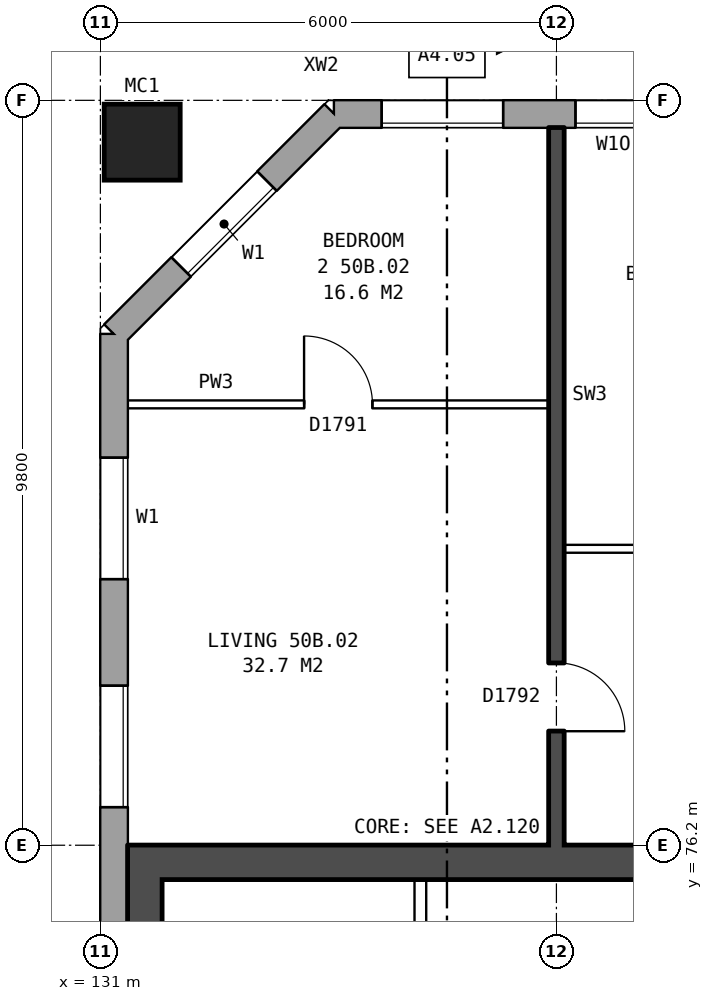
"""IFC4 building model, lengths in metres.
Left out: names, types, materials, properties, quantities, classifications, styles, units other than length and angle.
Written with IfcOpenShell. Run it as: python <this file> out.ifc"""

import sys

from ifc_helpers import new_model, si_unit, direction, frame, frame_2d, origin, origin_2d, place, context, subcontext, project, spatial, rectangle, hollow_rectangle, extrude, element, fill, save


model = new_model("IFC4")
c1 = context("Model", 3, precision=1e-05, world=origin(), true_north=direction((0.0, 1.0)))
c2 = subcontext(c1, "Body", "Model", "MODEL_VIEW")
j1 = project(units=[si_unit("LENGTHUNIT", "METRE"), si_unit("PLANEANGLEUNIT", "RADIAN")], contexts=[c1])
p1 = place(None, origin())
s1 = spatial("IfcSite", under=j1, at=p1, CompositionType="ELEMENT")
p2 = place(p1, origin())
s2 = spatial("IfcBuilding", under=s1, at=p2, CompositionType="ELEMENT")
p3 = place(p2, frame((0.0, 0.0, 178.9)))
s3 = spatial("IfcBuildingStorey", under=s2, at=p3, CompositionType="ELEMENT", Elevation=178.9)
p4 = place(p3, frame((131.55, 85.45, 0.0), z_axis=(0.0, 0.0, 1.0), x_axis=(1.0, 0.0, 0.0)))
e1 = element("IfcColumn", 1, at=p4, inside=s3, PredefinedType="COLUMN", context=c2, shape_type="SweptSolid", body=[
    extrude(hollow_rectangle(XDim=1.0, YDim=1.0, WallThickness=0.055, at=origin_2d()), origin(), (0.0, 0.0, 1.0), 3.1),
])
p5 = place(p3, frame((167.175, 85.82, 0.0), z_axis=(0.0, 0.0, 1.0), x_axis=(-1.0, 0.0, 0.0)))
e2 = element("IfcWall", 2, at=p5, inside=s3, PredefinedType="STANDARD", context=c2, shape_type="SweptSolid", body=[
    extrude(rectangle(XDim=33.101, YDim=0.36, at=frame_2d((16.55, 0.0))), origin(), (0.0, 0.0, 1.0), 2.85),
])
p6 = place(p5, frame((0.875, 0.0, 0.8)))
e3 = element("IfcOpeningElement", 3, at=p6, cuts=e2, PredefinedType="OPENING", context=c2, shape_type="SweptSolid", body=[
    extrude(rectangle(XDim=1.6, YDim=1.8, at=frame_2d((0.8, 0.9))), frame((0.0, 0.19, 0.0), z_axis=(0.0, -1.0, 0.0), x_axis=(1.0, 0.0, 0.0)), (0.0, 0.0, 1.0), 0.38),
])
p7 = place(p5, frame((2.8, 0.0, 1.4)))
e4 = element("IfcOpeningElement", 4, at=p7, cuts=e2, PredefinedType="OPENING", context=c2, shape_type="SweptSolid", body=[
    extrude(rectangle(XDim=1.4, YDim=1.2, at=frame_2d((0.7, 0.6))), frame((0.0, 0.19, 0.0), z_axis=(0.0, -1.0, 0.0), x_axis=(1.0, 0.0, 0.0)), (0.0, 0.0, 1.0), 0.38),
])
p8 = place(p5, frame((6.875, 0.0, 0.8)))
e5 = element("IfcOpeningElement", 5, at=p8, cuts=e2, PredefinedType="OPENING", context=c2, shape_type="SweptSolid", body=[
    extrude(rectangle(XDim=1.6, YDim=1.8, at=frame_2d((0.8, 0.9))), frame((0.0, 0.19, 0.0), z_axis=(0.0, -1.0, 0.0), x_axis=(1.0, 0.0, 0.0)), (0.0, 0.0, 1.0), 0.38),
])
p9 = place(p5, frame((9.875, 0.0, 0.8)))
e6 = element("IfcOpeningElement", 6, at=p9, cuts=e2, PredefinedType="OPENING", context=c2, shape_type="SweptSolid", body=[
    extrude(rectangle(XDim=1.6, YDim=1.8, at=frame_2d((0.8, 0.9))), frame((0.0, 0.19, 0.0), z_axis=(0.0, -1.0, 0.0), x_axis=(1.0, 0.0, 0.0)), (0.0, 0.0, 1.0), 0.38),
])
p10 = place(p5, frame((12.875, 0.0, 0.8)))
e7 = element("IfcOpeningElement", 7, at=p10, cuts=e2, PredefinedType="OPENING", context=c2, shape_type="SweptSolid", body=[
    extrude(rectangle(XDim=1.6, YDim=1.8, at=frame_2d((0.8, 0.9))), frame((0.0, 0.19, 0.0), z_axis=(0.0, -1.0, 0.0), x_axis=(1.0, 0.0, 0.0)), (0.0, 0.0, 1.0), 0.38),
])
p11 = place(p5, frame((15.875, 0.0, 0.8)))
e8 = element("IfcOpeningElement", 8, at=p11, cuts=e2, PredefinedType="OPENING", context=c2, shape_type="SweptSolid", body=[
    extrude(rectangle(XDim=1.6, YDim=1.8, at=frame_2d((0.8, 0.9))), frame((0.0, 0.19, 0.0), z_axis=(0.0, -1.0, 0.0), x_axis=(1.0, 0.0, 0.0)), (0.0, 0.0, 1.0), 0.38),
])
p12 = place(p5, frame((18.875, 0.0, 0.8)))
e9 = element("IfcOpeningElement", 9, at=p12, cuts=e2, PredefinedType="OPENING", context=c2, shape_type="SweptSolid", body=[
    extrude(rectangle(XDim=1.6, YDim=1.8, at=frame_2d((0.8, 0.9))), frame((0.0, 0.19, 0.0), z_axis=(0.0, -1.0, 0.0), x_axis=(1.0, 0.0, 0.0)), (0.0, 0.0, 1.0), 0.38),
])
p13 = place(p5, frame((21.875, 0.0, 0.8)))
e10 = element("IfcOpeningElement", 10, at=p13, cuts=e2, PredefinedType="OPENING", context=c2, shape_type="SweptSolid", body=[
    extrude(rectangle(XDim=1.6, YDim=1.8, at=frame_2d((0.8, 0.9))), frame((0.0, 0.19, 0.0), z_axis=(0.0, -1.0, 0.0), x_axis=(1.0, 0.0, 0.0)), (0.0, 0.0, 1.0), 0.38),
])
p14 = place(p5, frame((24.875, 0.0, 0.8)))
e11 = element("IfcOpeningElement", 11, at=p14, cuts=e2, PredefinedType="OPENING", context=c2, shape_type="SweptSolid", body=[
    extrude(rectangle(XDim=1.6, YDim=1.8, at=frame_2d((0.8, 0.9))), frame((0.0, 0.19, 0.0), z_axis=(0.0, -1.0, 0.0), x_axis=(1.0, 0.0, 0.0)), (0.0, 0.0, 1.0), 0.38),
])
p15 = place(p5, frame((26.775, 0.0, 0.8)))
e12 = element("IfcOpeningElement", 12, at=p15, cuts=e2, PredefinedType="OPENING", context=c2, shape_type="SweptSolid", body=[
    extrude(rectangle(XDim=0.8, YDim=0.9, at=frame_2d((0.4, 0.45))), frame((0.0, 0.19, 0.0), z_axis=(0.0, -1.0, 0.0), x_axis=(1.0, 0.0, 0.0)), (0.0, 0.0, 1.0), 0.38),
])
p16 = place(p5, frame((30.875, 0.0, 0.8)))
e13 = element("IfcOpeningElement", 13, at=p16, cuts=e2, PredefinedType="OPENING", context=c2, shape_type="SweptSolid", body=[
    extrude(rectangle(XDim=1.6, YDim=1.8, at=frame_2d((0.8, 0.9))), frame((0.0, 0.19, 0.0), z_axis=(0.0, -1.0, 0.0), x_axis=(1.0, 0.0, 0.0)), (0.0, 0.0, 1.0), 0.38),
])
p17 = place(p5, frame((28.925, 0.0, 1.4)))
e14 = element("IfcOpeningElement", 14, at=p17, cuts=e2, PredefinedType="OPENING", context=c2, shape_type="SweptSolid", body=[
    extrude(rectangle(XDim=1.0, YDim=1.2, at=frame_2d((0.5, 0.6))), frame((0.0, 0.19, 0.0), z_axis=(0.0, -1.0, 0.0), x_axis=(1.0, 0.0, 0.0)), (0.0, 0.0, 1.0), 0.38),
])
p18 = place(p3, frame((134.075, 85.82, 0.0), z_axis=(0.0, 0.0, 1.0), x_axis=(-0.707106781187, -0.707106781187, 0.0)))
e15 = element("IfcWall", 15, at=p18, inside=s3, PredefinedType="STANDARD", context=c2, shape_type="SweptSolid", body=[
    extrude(rectangle(XDim=4.094, YDim=0.36, at=frame_2d((2.047, 0.0))), origin(), (0.0, 0.0, 1.0), 2.85),
])
p19 = place(p18, frame((1.247, 0.0, 0.8)))
e16 = element("IfcOpeningElement", 16, at=p19, cuts=e15, PredefinedType="OPENING", context=c2, shape_type="SweptSolid", body=[
    extrude(rectangle(XDim=1.6, YDim=1.8, at=frame_2d((0.8, 0.9))), frame((0.0, 0.19, 0.0), z_axis=(0.0, -1.0, 0.0), x_axis=(1.0, 0.0, 0.0)), (0.0, 0.0, 1.0), 0.38),
])
p20 = place(p3, frame((131.18, 82.925, 0.0), z_axis=(0.0, 0.0, 1.0), x_axis=(0.0, -1.0, 0.0)))
e17 = element("IfcWall", 17, at=p20, inside=s3, PredefinedType="STANDARD", context=c2, shape_type="SweptSolid", body=[
    extrude(rectangle(XDim=25.851, YDim=0.36, at=frame_2d((12.925, 0.0))), origin(), (0.0, 0.0, 1.0), 2.85),
])
p21 = place(p20, frame((1.625, 0.0, 0.8)))
e18 = element("IfcOpeningElement", 18, at=p21, cuts=e17, PredefinedType="OPENING", context=c2, shape_type="SweptSolid", body=[
    extrude(rectangle(XDim=1.6, YDim=1.8, at=frame_2d((0.8, 0.9))), frame((0.0, 0.19, 0.0), z_axis=(0.0, -1.0, 0.0), x_axis=(1.0, 0.0, 0.0)), (0.0, 0.0, 1.0), 0.38),
])
p22 = place(p20, frame((4.625, 0.0, 0.8)))
e19 = element("IfcOpeningElement", 19, at=p22, cuts=e17, PredefinedType="OPENING", context=c2, shape_type="SweptSolid", body=[
    extrude(rectangle(XDim=1.6, YDim=1.8, at=frame_2d((0.8, 0.9))), frame((0.0, 0.19, 0.0), z_axis=(0.0, -1.0, 0.0), x_axis=(1.0, 0.0, 0.0)), (0.0, 0.0, 1.0), 0.38),
])
p23 = place(p20, frame((19.625, 0.0, 0.8)))
e20 = element("IfcOpeningElement", 20, at=p23, cuts=e17, PredefinedType="OPENING", context=c2, shape_type="SweptSolid", body=[
    extrude(rectangle(XDim=1.6, YDim=1.8, at=frame_2d((0.8, 0.9))), frame((0.0, 0.19, 0.0), z_axis=(0.0, -1.0, 0.0), x_axis=(1.0, 0.0, 0.0)), (0.0, 0.0, 1.0), 0.38),
])
p24 = place(p20, frame((22.625, 0.0, 0.8)))
e21 = element("IfcOpeningElement", 21, at=p24, cuts=e17, PredefinedType="OPENING", context=c2, shape_type="SweptSolid", body=[
    extrude(rectangle(XDim=1.6, YDim=1.8, at=frame_2d((0.8, 0.9))), frame((0.0, 0.19, 0.0), z_axis=(0.0, -1.0, 0.0), x_axis=(1.0, 0.0, 0.0)), (0.0, 0.0, 1.0), 0.38),
])
p25 = place(p3, frame((131.585, 63.8, 0.0), z_axis=(0.0, 0.0, 1.0), x_axis=(0.0, 1.0, 0.0)))
e22 = element("IfcWall", 22, at=p25, inside=s3, PredefinedType="SHEAR", context=c2, shape_type="SweptSolid", body=[
    extrude(rectangle(XDim=12.4, YDim=0.45, at=frame_2d((6.2, 0.0))), origin(), (0.0, 0.0, 1.0), 2.85),
])
p26 = place(p3, frame((139.31, 75.975, 0.0), z_axis=(0.0, 0.0, 1.0), x_axis=(-1.0, 0.0, 0.0)))
e23 = element("IfcWall", 23, at=p26, inside=s3, PredefinedType="SHEAR", context=c2, shape_type="SweptSolid", body=[
    extrude(rectangle(XDim=7.5, YDim=0.45, at=frame_2d((3.75, 0.0))), origin(), (0.0, 0.0, 1.0), 2.85),
])
p27 = place(p3, frame((135.21, 71.375, 0.0), z_axis=(0.0, 0.0, 1.0), x_axis=(0.0, 1.0, 0.0)))
e24 = element("IfcWall", 24, at=p27, inside=s3, PredefinedType="PARTITIONING", context=c2, shape_type="SweptSolid", body=[
    extrude(rectangle(XDim=4.375, YDim=0.15, at=frame_2d((2.188, 0.0))), origin(), (0.0, 0.0, 1.0), 2.85),
])
p28 = place(p27, frame((2.675, 0.0, 0.0)))
e25 = element("IfcOpeningElement", 25, at=p28, cuts=e24, PredefinedType="OPENING", context=c2, shape_type="SweptSolid", body=[
    extrude(rectangle(XDim=1.1, YDim=2.1, at=frame_2d((0.55, 1.05))), frame((0.0, 0.085, 0.0), z_axis=(0.0, -1.0, 0.0), x_axis=(1.0, 0.0, 0.0)), (0.0, 0.0, 1.0), 0.17),
])
p29 = place(p3, frame((137.1, 80.1, 0.0), z_axis=(0.0, 0.0, 1.0), x_axis=(1.0, 0.0, 0.0)))
e26 = element("IfcWall", 26, at=p29, inside=s3, PredefinedType="PARTITIONING", context=c2, shape_type="SweptSolid", body=[
    extrude(rectangle(XDim=5.8, YDim=0.1, at=frame_2d((2.9, 0.0))), origin(), (0.0, 0.0, 1.0), 2.85),
])
p30 = place(p29, frame((1.3, 0.0, 0.0)))
e27 = element("IfcOpeningElement", 27, at=p30, cuts=e26, PredefinedType="OPENING", context=c2, shape_type="SweptSolid", body=[
    extrude(rectangle(XDim=0.9, YDim=2.1, at=frame_2d((0.45, 1.05))), frame((0.0, 0.06, 0.0), z_axis=(0.0, -1.0, 0.0), x_axis=(1.0, 0.0, 0.0)), (0.0, 0.0, 1.0), 0.12),
])
p31 = place(p29, frame((4.2, 0.0, 0.0)))
e28 = element("IfcOpeningElement", 28, at=p31, cuts=e26, PredefinedType="OPENING", context=c2, shape_type="SweptSolid", body=[
    extrude(rectangle(XDim=0.9, YDim=2.1, at=frame_2d((0.45, 1.05))), frame((0.0, 0.06, 0.0), z_axis=(0.0, -1.0, 0.0), x_axis=(1.0, 0.0, 0.0)), (0.0, 0.0, 1.0), 0.12),
])
p32 = place(p3, frame((131.36, 82.0, 0.0), z_axis=(0.0, 0.0, 1.0), x_axis=(1.0, 0.0, 0.0)))
e29 = element("IfcWall", 29, at=p32, inside=s3, PredefinedType="PARTITIONING", context=c2, shape_type="SweptSolid", body=[
    extrude(rectangle(XDim=5.54, YDim=0.1, at=frame_2d((2.77, 0.0))), origin(), (0.0, 0.0, 1.0), 2.85),
])
p33 = place(p32, frame((2.32, 0.0, 0.0)))
e30 = element("IfcOpeningElement", 30, at=p33, cuts=e29, PredefinedType="OPENING", context=c2, shape_type="SweptSolid", body=[
    extrude(rectangle(XDim=0.9, YDim=2.1, at=frame_2d((0.45, 1.05))), frame((0.0, 0.06, 0.0), z_axis=(0.0, -1.0, 0.0), x_axis=(1.0, 0.0, 0.0)), (0.0, 0.0, 1.0), 0.12),
])
p34 = place(p3, frame((137.0, 76.2, 0.0), z_axis=(0.0, 0.0, 1.0), x_axis=(0.0, 1.0, 0.0)))
e31 = element("IfcWall", 31, at=p34, inside=s3, PredefinedType="SOLIDWALL", context=c2, shape_type="SweptSolid", body=[
    extrude(rectangle(XDim=9.44, YDim=0.2, at=frame_2d((4.72, 0.0))), origin(), (0.0, 0.0, 1.0), 2.85),
])
p35 = place(p34, frame((1.5, 0.0, 0.0)))
e32 = element("IfcOpeningElement", 32, at=p35, cuts=e31, PredefinedType="OPENING", context=c2, shape_type="SweptSolid", body=[
    extrude(rectangle(XDim=0.9, YDim=2.1, at=frame_2d((0.45, 1.05))), frame((0.0, 0.11, 0.0), z_axis=(0.0, -1.0, 0.0), x_axis=(1.0, 0.0, 0.0)), (0.0, 0.0, 1.0), 0.22),
])
p36 = place(p16, origin())
e33 = element("IfcWindow", 33, at=p36, inside=s3, PartitioningType="SINGLE_PANEL", PredefinedType="WINDOW", context=c2, shape_type="SweptSolid", body=[
    extrude(rectangle(XDim=1.6, YDim=1.8, at=frame_2d((0.8, 0.9))), frame((0.0, 0.15, 0.0), z_axis=(0.0, -1.0, 0.0), x_axis=(1.0, 0.0, 0.0)), (0.0, 0.0, 1.0), 0.06),
])
fill(e13, e33)
p37 = place(p19, origin())
e34 = element("IfcWindow", 34, at=p37, inside=s3, PartitioningType="SINGLE_PANEL", PredefinedType="WINDOW", context=c2, shape_type="SweptSolid", body=[
    extrude(rectangle(XDim=1.6, YDim=1.8, at=frame_2d((0.8, 0.9))), frame((0.0, 0.15, 0.0), z_axis=(0.0, -1.0, 0.0), x_axis=(1.0, 0.0, 0.0)), (0.0, 0.0, 1.0), 0.06),
])
fill(e16, e34)
p38 = place(p21, origin())
e35 = element("IfcWindow", 35, at=p38, inside=s3, PartitioningType="SINGLE_PANEL", PredefinedType="WINDOW", context=c2, shape_type="SweptSolid", body=[
    extrude(rectangle(XDim=1.6, YDim=1.8, at=frame_2d((0.8, 0.9))), frame((0.0, 0.15, 0.0), z_axis=(0.0, -1.0, 0.0), x_axis=(1.0, 0.0, 0.0)), (0.0, 0.0, 1.0), 0.06),
])
fill(e18, e35)
p39 = place(p22, origin())
e36 = element("IfcWindow", 36, at=p39, inside=s3, PartitioningType="SINGLE_PANEL", PredefinedType="WINDOW", context=c2, shape_type="SweptSolid", body=[
    extrude(rectangle(XDim=1.6, YDim=1.8, at=frame_2d((0.8, 0.9))), frame((0.0, 0.15, 0.0), z_axis=(0.0, -1.0, 0.0), x_axis=(1.0, 0.0, 0.0)), (0.0, 0.0, 1.0), 0.06),
])
fill(e19, e36)
p40 = place(p33, origin())
e37 = element("IfcDoor", 37, at=p40, inside=s3, OperationType="SINGLE_SWING_LEFT", PredefinedType="DOOR", context=c2, shape_type="SweptSolid", body=[
    extrude(rectangle(XDim=0.9, YDim=2.1, at=frame_2d((0.45, 1.05))), frame((0.0, 0.025, 0.0), z_axis=(0.0, -1.0, 0.0), x_axis=(1.0, 0.0, 0.0)), (0.0, 0.0, 1.0), 0.05),
])
fill(e30, e37)
p41 = place(p35, frame((0.9, 0.0, 0.0), z_axis=(0.0, 0.0, 1.0), x_axis=(-1.0, 0.0, 0.0)))
e38 = element("IfcDoor", 38, at=p41, inside=s3, OperationType="SINGLE_SWING_RIGHT", PredefinedType="DOOR", context=c2, shape_type="SweptSolid", body=[
    extrude(rectangle(XDim=0.9, YDim=2.1, at=frame_2d((0.45, 1.05))), frame((0.0, 0.025, 0.0), z_axis=(0.0, -1.0, 0.0), x_axis=(1.0, 0.0, 0.0)), (0.0, 0.0, 1.0), 0.05),
])
fill(e32, e38)
p42 = place(p17, origin())
e39 = element("IfcWindow", 39, at=p42, inside=s3, PartitioningType="SINGLE_PANEL", PredefinedType="WINDOW", context=c2, shape_type="SweptSolid", body=[
    extrude(rectangle(XDim=1.0, YDim=1.2, at=frame_2d((0.5, 0.6))), frame((0.0, 0.15, 0.0), z_axis=(0.0, -1.0, 0.0), x_axis=(1.0, 0.0, 0.0)), (0.0, 0.0, 1.0), 0.06),
])
fill(e14, e39)
save(model, sys.argv[1])
